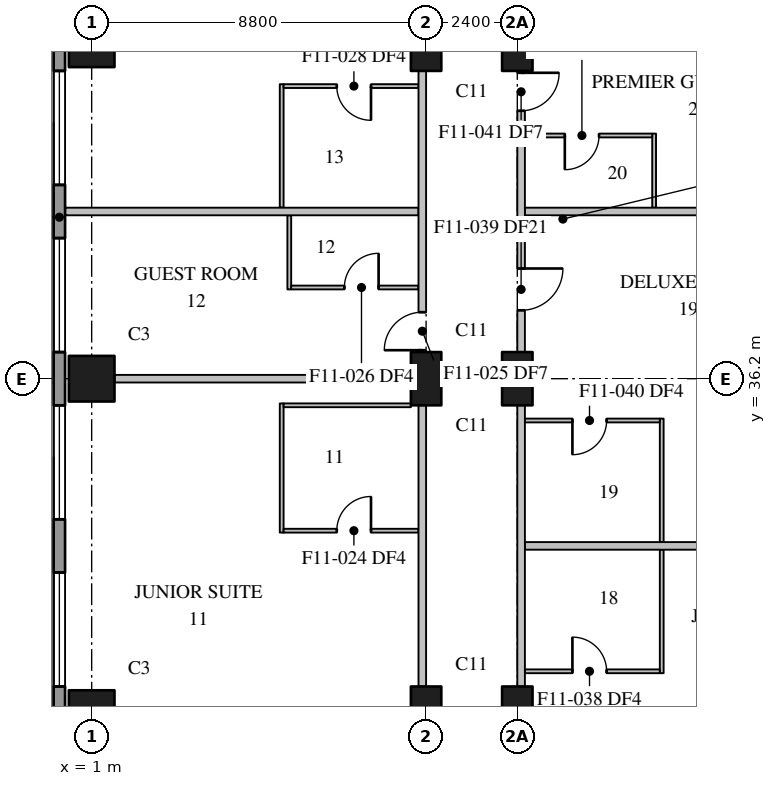
"""IFC4 building model, lengths in metres.
Left out: names, types, materials, properties, quantities, classifications, styles, units other than length and angle.
Written with IfcOpenShell. Run it as: python <this file> out.ifc"""

import sys

from ifc_helpers import new_model, si_unit, direction, frame, frame_2d, origin, origin_2d, place, context, subcontext, project, spatial, rectangle, extrude, element, fill, save


model = new_model("IFC4")
c1 = context("Model", 3, precision=1e-05, world=origin(), true_north=direction((0.0, 1.0)))
c2 = subcontext(c1, "Body", "Model", "MODEL_VIEW")
j1 = project(units=[si_unit("LENGTHUNIT", "METRE"), si_unit("PLANEANGLEUNIT", "RADIAN")], contexts=[c1])
p1 = place(None, origin())
s1 = spatial("IfcSite", under=j1, at=p1, CompositionType="ELEMENT")
p2 = place(p1, origin())
s2 = spatial("IfcBuilding", under=s1, at=p2, CompositionType="ELEMENT")
p3 = place(p2, frame((0.0, 0.0, 111.1)))
s3 = spatial("IfcBuildingStorey", under=s2, at=p3, CompositionType="ELEMENT", Elevation=111.1)
for number, where, z_axis, x_axis in (
    (1, (1.0, 27.4, 0.0), (0.0, 0.0, 1.0), (1.0, 0.0, 0.0)),
    (2, (1.0, 36.2, 0.0), (0.0, 0.0, 1.0), (1.0, 0.0, 0.0)),
    (3, (1.0, 45.0, 0.0), (0.0, 0.0, 1.0), (1.0, 0.0, 0.0)),
):
    element("IfcColumn", number, at=place(p3, frame(where, z_axis=z_axis, x_axis=x_axis)), inside=s3, PredefinedType="COLUMN", context=c2, shape_type="SweptSolid", body=[
        extrude(rectangle(XDim=1.2, YDim=1.2, at=origin_2d()), origin(), (0.0, 0.0, 1.0), 3.7),
    ])
for number, where, z_axis, x_axis in (
    (4, (9.8, 27.4, 0.0), (0.0, 0.0, 1.0), (0.0, 1.0, 0.0)),
    (5, (9.8, 36.2, 0.0), (0.0, 0.0, 1.0), (0.0, 1.0, 0.0)),
    (6, (9.8, 45.0, 0.0), (0.0, 0.0, 1.0), (0.0, 1.0, 0.0)),
    (7, (12.2, 27.4, 0.0), (0.0, 0.0, 1.0), (0.0, 1.0, 0.0)),
    (8, (12.2, 36.2, 0.0), (0.0, 0.0, 1.0), (0.0, 1.0, 0.0)),
    (9, (12.2, 45.0, 0.0), (0.0, 0.0, 1.0), (0.0, 1.0, 0.0)),
):
    element("IfcColumn", number, at=place(p3, frame(where, z_axis=z_axis, x_axis=x_axis)), inside=s3, PredefinedType="COLUMN", context=c2, shape_type="SweptSolid", body=[
        extrude(rectangle(XDim=1.4, YDim=0.8, at=origin_2d()), origin(), (0.0, 0.0, 1.0), 3.7),
    ])
p4 = place(p3, frame((0.15, 78.7, 0.0), z_axis=(0.0, 0.0, 1.0), x_axis=(0.0, -1.0, 0.0)))
e10 = element("IfcWall", 10, at=p4, inside=s3, PredefinedType="STANDARD", context=c2, shape_type="SweptSolid", body=[
    extrude(rectangle(XDim=76.5, YDim=0.3, at=frame_2d((38.25, 0.0))), origin(), (0.0, 0.0, 1.0), 3.4),
])
p5 = place(p4, frame((3.6, 0.0, 0.75)))
e11 = element("IfcOpeningElement", 11, at=p5, cuts=e10, PredefinedType="OPENING", context=c2, shape_type="SweptSolid", body=[
    extrude(rectangle(XDim=3.0, YDim=2.3, at=frame_2d((1.5, 1.15))), frame((0.0, 0.16, 0.0), z_axis=(0.0, -1.0, 0.0), x_axis=(1.0, 0.0, 0.0)), (0.0, 0.0, 1.0), 0.32),
])
p6 = place(p4, frame((8.0, 0.0, 0.75)))
e12 = element("IfcOpeningElement", 12, at=p6, cuts=e10, PredefinedType="OPENING", context=c2, shape_type="SweptSolid", body=[
    extrude(rectangle(XDim=3.0, YDim=2.3, at=frame_2d((1.5, 1.15))), frame((0.0, 0.16, 0.0), z_axis=(0.0, -1.0, 0.0), x_axis=(1.0, 0.0, 0.0)), (0.0, 0.0, 1.0), 0.32),
])
p7 = place(p4, frame((12.4, 0.0, 0.75)))
e13 = element("IfcOpeningElement", 13, at=p7, cuts=e10, PredefinedType="OPENING", context=c2, shape_type="SweptSolid", body=[
    extrude(rectangle(XDim=3.0, YDim=2.3, at=frame_2d((1.5, 1.15))), frame((0.0, 0.16, 0.0), z_axis=(0.0, -1.0, 0.0), x_axis=(1.0, 0.0, 0.0)), (0.0, 0.0, 1.0), 0.32),
])
p8 = place(p4, frame((16.8, 0.0, 0.75)))
e14 = element("IfcOpeningElement", 14, at=p8, cuts=e10, PredefinedType="OPENING", context=c2, shape_type="SweptSolid", body=[
    extrude(rectangle(XDim=3.0, YDim=2.3, at=frame_2d((1.5, 1.15))), frame((0.0, 0.16, 0.0), z_axis=(0.0, -1.0, 0.0), x_axis=(1.0, 0.0, 0.0)), (0.0, 0.0, 1.0), 0.32),
])
p9 = place(p4, frame((21.2, 0.0, 0.75)))
e15 = element("IfcOpeningElement", 15, at=p9, cuts=e10, PredefinedType="OPENING", context=c2, shape_type="SweptSolid", body=[
    extrude(rectangle(XDim=3.0, YDim=2.3, at=frame_2d((1.5, 1.15))), frame((0.0, 0.16, 0.0), z_axis=(0.0, -1.0, 0.0), x_axis=(1.0, 0.0, 0.0)), (0.0, 0.0, 1.0), 0.32),
])
p10 = place(p4, frame((25.6, 0.0, 0.75)))
e16 = element("IfcOpeningElement", 16, at=p10, cuts=e10, PredefinedType="OPENING", context=c2, shape_type="SweptSolid", body=[
    extrude(rectangle(XDim=3.0, YDim=2.3, at=frame_2d((1.5, 1.15))), frame((0.0, 0.16, 0.0), z_axis=(0.0, -1.0, 0.0), x_axis=(1.0, 0.0, 0.0)), (0.0, 0.0, 1.0), 0.32),
])
p11 = place(p4, frame((30.0, 0.0, 0.75)))
e17 = element("IfcOpeningElement", 17, at=p11, cuts=e10, PredefinedType="OPENING", context=c2, shape_type="SweptSolid", body=[
    extrude(rectangle(XDim=3.0, YDim=2.3, at=frame_2d((1.5, 1.15))), frame((0.0, 0.16, 0.0), z_axis=(0.0, -1.0, 0.0), x_axis=(1.0, 0.0, 0.0)), (0.0, 0.0, 1.0), 0.32),
])
p12 = place(p4, frame((34.4, 0.0, 0.75)))
e18 = element("IfcOpeningElement", 18, at=p12, cuts=e10, PredefinedType="OPENING", context=c2, shape_type="SweptSolid", body=[
    extrude(rectangle(XDim=3.0, YDim=2.3, at=frame_2d((1.5, 1.15))), frame((0.0, 0.16, 0.0), z_axis=(0.0, -1.0, 0.0), x_axis=(1.0, 0.0, 0.0)), (0.0, 0.0, 1.0), 0.32),
])
p13 = place(p4, frame((38.8, 0.0, 0.75)))
e19 = element("IfcOpeningElement", 19, at=p13, cuts=e10, PredefinedType="OPENING", context=c2, shape_type="SweptSolid", body=[
    extrude(rectangle(XDim=3.0, YDim=2.3, at=frame_2d((1.5, 1.15))), frame((0.0, 0.16, 0.0), z_axis=(0.0, -1.0, 0.0), x_axis=(1.0, 0.0, 0.0)), (0.0, 0.0, 1.0), 0.32),
])
p14 = place(p4, frame((43.2, 0.0, 0.75)))
e20 = element("IfcOpeningElement", 20, at=p14, cuts=e10, PredefinedType="OPENING", context=c2, shape_type="SweptSolid", body=[
    extrude(rectangle(XDim=3.0, YDim=2.3, at=frame_2d((1.5, 1.15))), frame((0.0, 0.16, 0.0), z_axis=(0.0, -1.0, 0.0), x_axis=(1.0, 0.0, 0.0)), (0.0, 0.0, 1.0), 0.32),
])
p15 = place(p4, frame((47.6, 0.0, 0.75)))
e21 = element("IfcOpeningElement", 21, at=p15, cuts=e10, PredefinedType="OPENING", context=c2, shape_type="SweptSolid", body=[
    extrude(rectangle(XDim=3.0, YDim=2.3, at=frame_2d((1.5, 1.15))), frame((0.0, 0.16, 0.0), z_axis=(0.0, -1.0, 0.0), x_axis=(1.0, 0.0, 0.0)), (0.0, 0.0, 1.0), 0.32),
])
p16 = place(p4, frame((52.0, 0.0, 0.75)))
e22 = element("IfcOpeningElement", 22, at=p16, cuts=e10, PredefinedType="OPENING", context=c2, shape_type="SweptSolid", body=[
    extrude(rectangle(XDim=3.0, YDim=2.3, at=frame_2d((1.5, 1.15))), frame((0.0, 0.16, 0.0), z_axis=(0.0, -1.0, 0.0), x_axis=(1.0, 0.0, 0.0)), (0.0, 0.0, 1.0), 0.32),
])
p17 = place(p4, frame((56.4, 0.0, 0.75)))
e23 = element("IfcOpeningElement", 23, at=p17, cuts=e10, PredefinedType="OPENING", context=c2, shape_type="SweptSolid", body=[
    extrude(rectangle(XDim=3.0, YDim=2.3, at=frame_2d((1.5, 1.15))), frame((0.0, 0.16, 0.0), z_axis=(0.0, -1.0, 0.0), x_axis=(1.0, 0.0, 0.0)), (0.0, 0.0, 1.0), 0.32),
])
p18 = place(p4, frame((60.8, 0.0, 0.75)))
e24 = element("IfcOpeningElement", 24, at=p18, cuts=e10, PredefinedType="OPENING", context=c2, shape_type="SweptSolid", body=[
    extrude(rectangle(XDim=3.0, YDim=2.3, at=frame_2d((1.5, 1.15))), frame((0.0, 0.16, 0.0), z_axis=(0.0, -1.0, 0.0), x_axis=(1.0, 0.0, 0.0)), (0.0, 0.0, 1.0), 0.32),
])
p19 = place(p4, frame((65.2, 0.0, 0.75)))
e25 = element("IfcOpeningElement", 25, at=p19, cuts=e10, PredefinedType="OPENING", context=c2, shape_type="SweptSolid", body=[
    extrude(rectangle(XDim=3.0, YDim=2.3, at=frame_2d((1.5, 1.15))), frame((0.0, 0.16, 0.0), z_axis=(0.0, -1.0, 0.0), x_axis=(1.0, 0.0, 0.0)), (0.0, 0.0, 1.0), 0.32),
])
p20 = place(p4, frame((69.6, 0.0, 0.75)))
e26 = element("IfcOpeningElement", 26, at=p20, cuts=e10, PredefinedType="OPENING", context=c2, shape_type="SweptSolid", body=[
    extrude(rectangle(XDim=3.0, YDim=2.3, at=frame_2d((1.5, 1.15))), frame((0.0, 0.16, 0.0), z_axis=(0.0, -1.0, 0.0), x_axis=(1.0, 0.0, 0.0)), (0.0, 0.0, 1.0), 0.32),
])
p21 = place(p3, frame((9.7, 28.1, 0.0), z_axis=(0.0, 0.0, 1.0), x_axis=(0.0, 1.0, 0.0)))
e27 = element("IfcWall", 27, at=p21, inside=s3, PredefinedType="PARTITIONING", context=c2, shape_type="SweptSolid", body=[
    extrude(rectangle(XDim=7.4, YDim=0.2, at=frame_2d((3.7, 0.0))), origin(), (0.0, 0.0, 1.0), 3.4),
])
p22 = place(p3, frame((9.7, 36.9, 0.0), z_axis=(0.0, 0.0, 1.0), x_axis=(0.0, 1.0, 0.0)))
e28 = element("IfcWall", 28, at=p22, inside=s3, PredefinedType="PARTITIONING", context=c2, shape_type="SweptSolid", body=[
    extrude(rectangle(XDim=7.4, YDim=0.2, at=frame_2d((3.7, 0.0))), origin(), (0.0, 0.0, 1.0), 3.4),
])
p23 = place(p22, frame((0.05, 0.0, 0.0)))
e29 = element("IfcOpeningElement", 29, at=p23, cuts=e28, PredefinedType="OPENING", context=c2, shape_type="SweptSolid", body=[
    extrude(rectangle(XDim=1.0, YDim=2.1, at=frame_2d((0.5, 1.05))), frame((0.0, 0.11, 0.0), z_axis=(0.0, -1.0, 0.0), x_axis=(1.0, 0.0, 0.0)), (0.0, 0.0, 1.0), 0.22),
])
p24 = place(p3, frame((1.6, 36.2, 0.0), z_axis=(0.0, 0.0, 1.0), x_axis=(1.0, 0.0, 0.0)))
e30 = element("IfcWall", 30, at=p24, inside=s3, PredefinedType="PARTITIONING", context=c2, shape_type="SweptSolid", body=[
    extrude(rectangle(XDim=7.8, YDim=0.2, at=frame_2d((3.9, 0.0))), origin(), (0.0, 0.0, 1.0), 3.4),
])
p25 = place(p3, frame((0.31, 40.6, 0.0), z_axis=(0.0, 0.0, 1.0), x_axis=(1.0, 0.0, 0.0)))
e31 = element("IfcWall", 31, at=p25, inside=s3, PredefinedType="PARTITIONING", context=c2, shape_type="SweptSolid", body=[
    extrude(rectangle(XDim=9.29, YDim=0.2, at=frame_2d((4.645, 0.0))), origin(), (0.0, 0.0, 1.0), 3.4),
])
p26 = place(p3, frame((12.4, 40.6, 0.0), z_axis=(0.0, 0.0, 1.0), x_axis=(1.0, 0.0, 0.0)))
e32 = element("IfcWall", 32, at=p26, inside=s3, PredefinedType="PARTITIONING", context=c2, shape_type="SweptSolid", body=[
    extrude(rectangle(XDim=14.27, YDim=0.2, at=frame_2d((7.135, 0.0))), origin(), (0.0, 0.0, 1.0), 3.4),
])
p27 = place(p3, frame((12.3, 28.1, 0.0), z_axis=(0.0, 0.0, 1.0), x_axis=(0.0, 1.0, 0.0)))
e33 = element("IfcWall", 33, at=p27, inside=s3, PredefinedType="PARTITIONING", context=c2, shape_type="SweptSolid", body=[
    extrude(rectangle(XDim=7.4, YDim=0.2, at=frame_2d((3.7, 0.0))), origin(), (0.0, 0.0, 1.0), 3.4),
])
p28 = place(p3, frame((12.3, 44.3, 0.0), z_axis=(0.0, 0.0, 1.0), x_axis=(0.0, -1.0, 0.0)))
e34 = element("IfcWall", 34, at=p28, inside=s3, PredefinedType="PARTITIONING", context=c2, shape_type="SweptSolid", body=[
    extrude(rectangle(XDim=7.4, YDim=0.2, at=frame_2d((3.7, 0.0))), origin(), (0.0, 0.0, 1.0), 3.4),
])
p29 = place(p28, frame((5.2, 0.0, 0.0)))
e35 = element("IfcOpeningElement", 35, at=p29, cuts=e34, PredefinedType="OPENING", context=c2, shape_type="SweptSolid", body=[
    extrude(rectangle(XDim=1.1, YDim=2.1, at=frame_2d((0.55, 1.05))), frame((0.0, 0.11, 0.0), z_axis=(0.0, -1.0, 0.0), x_axis=(1.0, 0.0, 0.0)), (0.0, 0.0, 1.0), 0.22),
])
p30 = place(p28, frame((0.05, 0.0, 0.0)))
e36 = element("IfcOpeningElement", 36, at=p30, cuts=e34, PredefinedType="OPENING", context=c2, shape_type="SweptSolid", body=[
    extrude(rectangle(XDim=1.0, YDim=2.1, at=frame_2d((0.5, 1.05))), frame((0.0, 0.11, 0.0), z_axis=(0.0, -1.0, 0.0), x_axis=(1.0, 0.0, 0.0)), (0.0, 0.0, 1.0), 0.22),
])
p31 = place(p3, frame((12.4, 31.8, 0.0), z_axis=(0.0, 0.0, 1.0), x_axis=(1.0, 0.0, 0.0)))
e37 = element("IfcWall", 37, at=p31, inside=s3, PredefinedType="PARTITIONING", context=c2, shape_type="SweptSolid", body=[
    extrude(rectangle(XDim=14.27, YDim=0.2, at=frame_2d((7.135, 0.0))), origin(), (0.0, 0.0, 1.0), 3.4),
])
p32 = place(p3, frame((6.2, 38.55, 0.0), z_axis=(0.0, 0.0, 1.0), x_axis=(0.0, 1.0, 0.0)))
e38 = element("IfcWall", 38, at=p32, inside=s3, PredefinedType="PARTITIONING", context=c2, shape_type="SweptSolid", body=[
    extrude(rectangle(XDim=1.95, YDim=0.1, at=frame_2d((0.975, 0.0))), origin(), (0.0, 0.0, 1.0), 3.4),
])
p33 = place(p3, frame((6.0, 32.15, 0.0), z_axis=(0.0, 0.0, 1.0), x_axis=(0.0, 1.0, 0.0)))
e39 = element("IfcWall", 39, at=p33, inside=s3, PredefinedType="PARTITIONING", context=c2, shape_type="SweptSolid", body=[
    extrude(rectangle(XDim=3.4, YDim=0.1, at=frame_2d((1.7, 0.0))), origin(), (0.0, 0.0, 1.0), 3.4),
])
p34 = place(p3, frame((6.0, 40.7, 0.0), z_axis=(0.0, 0.0, 1.0), x_axis=(0.0, 1.0, 0.0)))
e40 = element("IfcWall", 40, at=p34, inside=s3, PredefinedType="PARTITIONING", context=c2, shape_type="SweptSolid", body=[
    extrude(rectangle(XDim=3.25, YDim=0.1, at=frame_2d((1.625, 0.0))), origin(), (0.0, 0.0, 1.0), 3.4),
])
p35 = place(p3, frame((6.05, 32.2, 0.0), z_axis=(0.0, 0.0, 1.0), x_axis=(1.0, 0.0, 0.0)))
e41 = element("IfcWall", 41, at=p35, inside=s3, PredefinedType="PARTITIONING", context=c2, shape_type="SweptSolid", body=[
    extrude(rectangle(XDim=3.55, YDim=0.1, at=frame_2d((1.775, 0.0))), origin(), (0.0, 0.0, 1.0), 3.4),
])
p36 = place(p35, frame((1.4, 0.0, 0.0)))
e42 = element("IfcOpeningElement", 42, at=p36, cuts=e41, PredefinedType="OPENING", context=c2, shape_type="SweptSolid", body=[
    extrude(rectangle(XDim=0.9, YDim=2.1, at=frame_2d((0.45, 1.05))), frame((0.0, 0.06, 0.0), z_axis=(0.0, -1.0, 0.0), x_axis=(1.0, 0.0, 0.0)), (0.0, 0.0, 1.0), 0.12),
])
p37 = place(p3, frame((6.05, 35.5, 0.0), z_axis=(0.0, 0.0, 1.0), x_axis=(1.0, 0.0, 0.0)))
e43 = element("IfcWall", 43, at=p37, inside=s3, PredefinedType="PARTITIONING", context=c2, shape_type="SweptSolid", body=[
    extrude(rectangle(XDim=3.35, YDim=0.1, at=frame_2d((1.675, 0.0))), origin(), (0.0, 0.0, 1.0), 3.4),
])
p38 = place(p3, frame((6.25, 38.6, 0.0), z_axis=(0.0, 0.0, 1.0), x_axis=(1.0, 0.0, 0.0)))
e44 = element("IfcWall", 44, at=p38, inside=s3, PredefinedType="PARTITIONING", context=c2, shape_type="SweptSolid", body=[
    extrude(rectangle(XDim=3.35, YDim=0.1, at=frame_2d((1.675, 0.0))), origin(), (0.0, 0.0, 1.0), 3.4),
])
p39 = place(p38, frame((1.4, 0.0, 0.0)))
e45 = element("IfcOpeningElement", 45, at=p39, cuts=e44, PredefinedType="OPENING", context=c2, shape_type="SweptSolid", body=[
    extrude(rectangle(XDim=0.9, YDim=2.1, at=frame_2d((0.45, 1.05))), frame((0.0, 0.06, 0.0), z_axis=(0.0, -1.0, 0.0), x_axis=(1.0, 0.0, 0.0)), (0.0, 0.0, 1.0), 0.12),
])
p40 = place(p3, frame((9.6, 43.9, 0.0), z_axis=(0.0, 0.0, 1.0), x_axis=(-1.0, 0.0, 0.0)))
e46 = element("IfcWall", 46, at=p40, inside=s3, PredefinedType="PARTITIONING", context=c2, shape_type="SweptSolid", body=[
    extrude(rectangle(XDim=3.55, YDim=0.1, at=frame_2d((1.775, 0.0))), origin(), (0.0, 0.0, 1.0), 3.4),
])
p41 = place(p40, frame((1.25, 0.0, 0.0)))
e47 = element("IfcOpeningElement", 47, at=p41, cuts=e46, PredefinedType="OPENING", context=c2, shape_type="SweptSolid", body=[
    extrude(rectangle(XDim=0.9, YDim=2.1, at=frame_2d((0.45, 1.05))), frame((0.0, 0.06, 0.0), z_axis=(0.0, -1.0, 0.0), x_axis=(1.0, 0.0, 0.0)), (0.0, 0.0, 1.0), 0.12),
])
for number, where, z_axis, x_axis in (
    (48, (16.0, 28.45, 0.0), (0.0, 0.0, 1.0), (0.0, 1.0, 0.0)),
    (49, (16.0, 31.9, 0.0), (0.0, 0.0, 1.0), (0.0, 1.0, 0.0)),
):
    element("IfcWall", number, at=place(p3, frame(where, z_axis=z_axis, x_axis=x_axis)), inside=s3, PredefinedType="PARTITIONING", context=c2, shape_type="SweptSolid", body=[
        extrude(rectangle(XDim=3.25, YDim=0.1, at=frame_2d((1.625, 0.0))), origin(), (0.0, 0.0, 1.0), 3.4),
    ])
p42 = place(p3, frame((12.4, 28.5, 0.0), z_axis=(0.0, 0.0, 1.0), x_axis=(1.0, 0.0, 0.0)))
e50 = element("IfcWall", 50, at=p42, inside=s3, PredefinedType="PARTITIONING", context=c2, shape_type="SweptSolid", body=[
    extrude(rectangle(XDim=3.55, YDim=0.1, at=frame_2d((1.775, 0.0))), origin(), (0.0, 0.0, 1.0), 3.4),
])
p43 = place(p42, frame((1.25, 0.0, 0.0)))
e51 = element("IfcOpeningElement", 51, at=p43, cuts=e50, PredefinedType="OPENING", context=c2, shape_type="SweptSolid", body=[
    extrude(rectangle(XDim=0.9, YDim=2.1, at=frame_2d((0.45, 1.05))), frame((0.0, 0.06, 0.0), z_axis=(0.0, -1.0, 0.0), x_axis=(1.0, 0.0, 0.0)), (0.0, 0.0, 1.0), 0.12),
])
p44 = place(p3, frame((15.95, 35.1, 0.0), z_axis=(0.0, 0.0, 1.0), x_axis=(-1.0, 0.0, 0.0)))
e52 = element("IfcWall", 52, at=p44, inside=s3, PredefinedType="PARTITIONING", context=c2, shape_type="SweptSolid", body=[
    extrude(rectangle(XDim=3.55, YDim=0.1, at=frame_2d((1.775, 0.0))), origin(), (0.0, 0.0, 1.0), 3.4),
])
p45 = place(p44, frame((1.4, 0.0, 0.0)))
e53 = element("IfcOpeningElement", 53, at=p45, cuts=e52, PredefinedType="OPENING", context=c2, shape_type="SweptSolid", body=[
    extrude(rectangle(XDim=0.9, YDim=2.1, at=frame_2d((0.45, 1.05))), frame((0.0, 0.06, 0.0), z_axis=(0.0, -1.0, 0.0), x_axis=(1.0, 0.0, 0.0)), (0.0, 0.0, 1.0), 0.12),
])
p46 = place(p3, frame((15.8, 40.7, 0.0), z_axis=(0.0, 0.0, 1.0), x_axis=(0.0, 1.0, 0.0)))
e54 = element("IfcWall", 54, at=p46, inside=s3, PredefinedType="PARTITIONING", context=c2, shape_type="SweptSolid", body=[
    extrude(rectangle(XDim=1.95, YDim=0.1, at=frame_2d((0.975, 0.0))), origin(), (0.0, 0.0, 1.0), 3.4),
])
p47 = place(p3, frame((15.75, 42.6, 0.0), z_axis=(0.0, 0.0, 1.0), x_axis=(-1.0, 0.0, 0.0)))
e55 = element("IfcWall", 55, at=p47, inside=s3, PredefinedType="PARTITIONING", context=c2, shape_type="SweptSolid", body=[
    extrude(rectangle(XDim=3.35, YDim=0.1, at=frame_2d((1.675, 0.0))), origin(), (0.0, 0.0, 1.0), 3.4),
])
p48 = place(p47, frame((1.4, 0.0, 0.0)))
e56 = element("IfcOpeningElement", 56, at=p48, cuts=e55, PredefinedType="OPENING", context=c2, shape_type="SweptSolid", body=[
    extrude(rectangle(XDim=0.9, YDim=2.1, at=frame_2d((0.45, 1.05))), frame((0.0, 0.06, 0.0), z_axis=(0.0, -1.0, 0.0), x_axis=(1.0, 0.0, 0.0)), (0.0, 0.0, 1.0), 0.12),
])
p49 = place(p12, origin())
e57 = element("IfcWindow", 57, at=p49, inside=s3, PartitioningType="SINGLE_PANEL", PredefinedType="WINDOW", context=c2, shape_type="SweptSolid", body=[
    extrude(rectangle(XDim=3.0, YDim=2.3, at=frame_2d((1.5, 1.15))), frame((0.0, 0.03, 0.0), z_axis=(0.0, -1.0, 0.0), x_axis=(1.0, 0.0, 0.0)), (0.0, 0.0, 1.0), 0.06),
])
fill(e18, e57)
p50 = place(p13, origin())
e58 = element("IfcWindow", 58, at=p50, inside=s3, PartitioningType="SINGLE_PANEL", PredefinedType="WINDOW", context=c2, shape_type="SweptSolid", body=[
    extrude(rectangle(XDim=3.0, YDim=2.3, at=frame_2d((1.5, 1.15))), frame((0.0, 0.03, 0.0), z_axis=(0.0, -1.0, 0.0), x_axis=(1.0, 0.0, 0.0)), (0.0, 0.0, 1.0), 0.06),
])
fill(e19, e58)
p51 = place(p14, origin())
e59 = element("IfcWindow", 59, at=p51, inside=s3, PartitioningType="SINGLE_PANEL", PredefinedType="WINDOW", context=c2, shape_type="SweptSolid", body=[
    extrude(rectangle(XDim=3.0, YDim=2.3, at=frame_2d((1.5, 1.15))), frame((0.0, 0.03, 0.0), z_axis=(0.0, -1.0, 0.0), x_axis=(1.0, 0.0, 0.0)), (0.0, 0.0, 1.0), 0.06),
])
fill(e20, e59)
p52 = place(p15, origin())
e60 = element("IfcWindow", 60, at=p52, inside=s3, PartitioningType="SINGLE_PANEL", PredefinedType="WINDOW", context=c2, shape_type="SweptSolid", body=[
    extrude(rectangle(XDim=3.0, YDim=2.3, at=frame_2d((1.5, 1.15))), frame((0.0, 0.03, 0.0), z_axis=(0.0, -1.0, 0.0), x_axis=(1.0, 0.0, 0.0)), (0.0, 0.0, 1.0), 0.06),
])
fill(e21, e60)
p53 = place(p36, origin())
e61 = element("IfcDoor", 61, at=p53, inside=s3, OperationType="SINGLE_SWING_RIGHT", PredefinedType="DOOR", context=c2, shape_type="SweptSolid", body=[
    extrude(rectangle(XDim=0.9, YDim=2.1, at=frame_2d((0.45, 1.05))), frame((0.0, 0.025, 0.0), z_axis=(0.0, -1.0, 0.0), x_axis=(1.0, 0.0, 0.0)), (0.0, 0.0, 1.0), 0.05),
])
fill(e42, e61)
p54 = place(p23, origin())
e62 = element("IfcDoor", 62, at=p54, inside=s3, OperationType="SINGLE_SWING_LEFT", PredefinedType="DOOR", context=c2, shape_type="SweptSolid", body=[
    extrude(rectangle(XDim=1.0, YDim=2.1, at=frame_2d((0.5, 1.05))), frame((0.0, 0.025, 0.0), z_axis=(0.0, -1.0, 0.0), x_axis=(1.0, 0.0, 0.0)), (0.0, 0.0, 1.0), 0.05),
])
fill(e29, e62)
p55 = place(p39, origin())
e63 = element("IfcDoor", 63, at=p55, inside=s3, OperationType="SINGLE_SWING_RIGHT", PredefinedType="DOOR", context=c2, shape_type="SweptSolid", body=[
    extrude(rectangle(XDim=0.9, YDim=2.1, at=frame_2d((0.45, 1.05))), frame((0.0, 0.025, 0.0), z_axis=(0.0, -1.0, 0.0), x_axis=(1.0, 0.0, 0.0)), (0.0, 0.0, 1.0), 0.05),
])
fill(e45, e63)
p56 = place(p41, origin())
e64 = element("IfcDoor", 64, at=p56, inside=s3, OperationType="SINGLE_SWING_LEFT", PredefinedType="DOOR", context=c2, shape_type="SweptSolid", body=[
    extrude(rectangle(XDim=0.9, YDim=2.1, at=frame_2d((0.45, 1.05))), frame((0.0, 0.025, 0.0), z_axis=(0.0, -1.0, 0.0), x_axis=(1.0, 0.0, 0.0)), (0.0, 0.0, 1.0), 0.05),
])
fill(e47, e64)
p57 = place(p43, origin())
e65 = element("IfcDoor", 65, at=p57, inside=s3, OperationType="SINGLE_SWING_LEFT", PredefinedType="DOOR", context=c2, shape_type="SweptSolid", body=[
    extrude(rectangle(XDim=0.9, YDim=2.1, at=frame_2d((0.45, 1.05))), frame((0.0, 0.025, 0.0), z_axis=(0.0, -1.0, 0.0), x_axis=(1.0, 0.0, 0.0)), (0.0, 0.0, 1.0), 0.05),
])
fill(e51, e65)
p58 = place(p29, origin())
e66 = element("IfcDoor", 66, at=p58, inside=s3, OperationType="SINGLE_SWING_LEFT", PredefinedType="DOOR", context=c2, shape_type="SweptSolid", body=[
    extrude(rectangle(XDim=1.1, YDim=2.1, at=frame_2d((0.55, 1.05))), frame((0.0, 0.025, 0.0), z_axis=(0.0, -1.0, 0.0), x_axis=(1.0, 0.0, 0.0)), (0.0, 0.0, 1.0), 0.05),
])
fill(e35, e66)
p59 = place(p45, origin())
e67 = element("IfcDoor", 67, at=p59, inside=s3, OperationType="SINGLE_SWING_RIGHT", PredefinedType="DOOR", context=c2, shape_type="SweptSolid", body=[
    extrude(rectangle(XDim=0.9, YDim=2.1, at=frame_2d((0.45, 1.05))), frame((0.0, 0.025, 0.0), z_axis=(0.0, -1.0, 0.0), x_axis=(1.0, 0.0, 0.0)), (0.0, 0.0, 1.0), 0.05),
])
fill(e53, e67)
p60 = place(p30, origin())
e68 = element("IfcDoor", 68, at=p60, inside=s3, OperationType="SINGLE_SWING_LEFT", PredefinedType="DOOR", context=c2, shape_type="SweptSolid", body=[
    extrude(rectangle(XDim=1.0, YDim=2.1, at=frame_2d((0.5, 1.05))), frame((0.0, 0.025, 0.0), z_axis=(0.0, -1.0, 0.0), x_axis=(1.0, 0.0, 0.0)), (0.0, 0.0, 1.0), 0.05),
])
fill(e36, e68)
p61 = place(p48, origin())
e69 = element("IfcDoor", 69, at=p61, inside=s3, OperationType="SINGLE_SWING_RIGHT", PredefinedType="DOOR", context=c2, shape_type="SweptSolid", body=[
    extrude(rectangle(XDim=0.9, YDim=2.1, at=frame_2d((0.45, 1.05))), frame((0.0, 0.025, 0.0), z_axis=(0.0, -1.0, 0.0), x_axis=(1.0, 0.0, 0.0)), (0.0, 0.0, 1.0), 0.05),
])
fill(e56, e69)
save(model, sys.argv[1])
